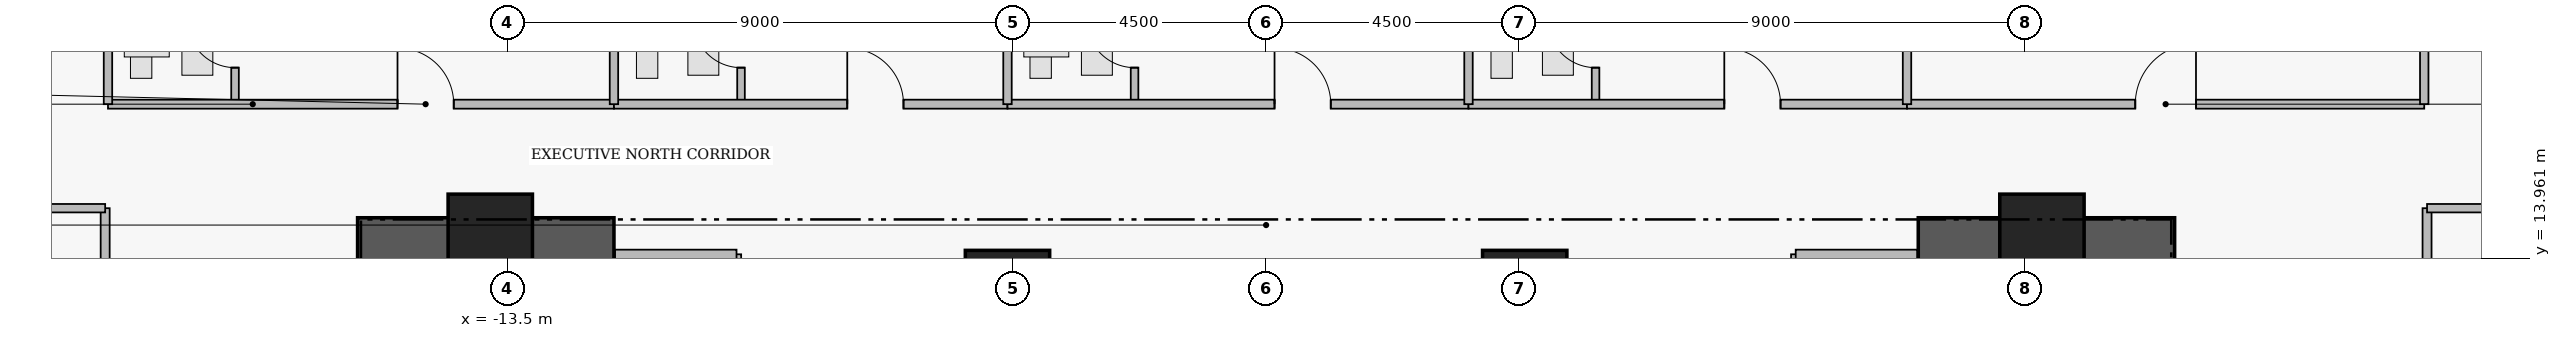
"""IFC4 building model, lengths in metres.
Left out: names, types, materials, properties, quantities, classifications, styles, units other than length and angle.
Written with IfcOpenShell. Run it as: python <this file> out.ifc"""

import sys

from ifc_helpers import new_model, si_unit, direction, frame, frame_2d, origin, origin_2d, place, context, subcontext, project, spatial, rectangle, extrude, element, fill, save


model = new_model("IFC4")
c1 = context("Model", 3, precision=1e-05, world=origin(), true_north=direction((0.0, 1.0)))
c2 = subcontext(c1, "Body", "Model", "MODEL_VIEW")
j1 = project(units=[si_unit("LENGTHUNIT", "METRE"), si_unit("PLANEANGLEUNIT", "RADIAN")], contexts=[c1])
p1 = place(None, origin())
s1 = spatial("IfcSite", under=j1, at=p1, CompositionType="ELEMENT")
p2 = place(p1, origin())
s2 = spatial("IfcBuilding", under=s1, at=p2, CompositionType="ELEMENT")
p3 = place(p2, frame((0.0, 0.0, 117.55)))
s3 = spatial("IfcBuildingStorey", under=s2, at=p3, CompositionType="ELEMENT", Elevation=117.55)
for number, where, z_axis, x_axis in (
    (1, (-16.16, 14.305, 0.0), (0.0, 0.0, 1.0), (1.0, 0.0, 0.0)),
    (2, (11.6, 14.305, 0.0), (0.0, 0.0, 1.0), (1.0, 0.0, 0.0)),
):
    element("IfcWall", number, at=place(p3, frame(where, z_axis=z_axis, x_axis=x_axis)), inside=s3, PredefinedType="SHEAR", context=c2, shape_type="SweptSolid", body=[
        extrude(rectangle(XDim=4.56, YDim=0.75, at=frame_2d((2.28, 0.0))), origin(), (0.0, 0.0, 1.0), 3.46),
    ])
for number, where, z_axis, x_axis in (
    (3, (-13.8, 14.35, 0.0), (0.0, 0.0, 1.0), (1.0, 0.0, 0.0)),
    (4, (-4.6, 13.35, 0.0), (0.0, 0.0, 1.0), (1.0, 0.0, 0.0)),
    (5, (4.6, 13.35, 0.0), (0.0, 0.0, 1.0), (1.0, 0.0, 0.0)),
    (6, (13.8, 14.35, 0.0), (0.0, 0.0, 1.0), (1.0, 0.0, 0.0)),
):
    element("IfcColumn", number, at=place(p3, frame(where, z_axis=z_axis, x_axis=x_axis)), inside=s3, PredefinedType="COLUMN", context=c2, shape_type="SweptSolid", body=[
        extrude(rectangle(XDim=1.5, YDim=1.5, at=origin_2d()), origin(), (0.0, 0.0, 1.0), 3.65),
    ])
p4 = place(p3, frame((-18.34, 16.7, 0.0), z_axis=(0.0, 0.0, 1.0), x_axis=(0.0, 1.0, 0.0)))
e7 = element("IfcWall", 7, at=p4, inside=s3, PredefinedType="PLUMBINGWALL", context=c2, shape_type="SweptSolid", body=[
    extrude(rectangle(XDim=2.36, YDim=0.135, at=frame_2d((1.18, 0.0))), origin(), (0.0, 0.0, 1.0), 3.43),
])
p5 = place(p4, frame((0.65, 0.0, 0.0)))
e8 = element("IfcOpeningElement", 8, at=p5, cuts=e7, PredefinedType="OPENING", context=c2, shape_type="SweptSolid", body=[
    extrude(rectangle(XDim=0.85, YDim=2.1, at=frame_2d((0.425, 1.05))), frame((0.0, 0.077, 0.0), z_axis=(0.0, -1.0, 0.0), x_axis=(1.0, 0.0, 0.0)), (0.0, 0.0, 1.0), 0.155),
])
p6 = place(p3, frame((-20.6, 16.7, 0.0), z_axis=(0.0, 0.0, 1.0), x_axis=(1.0, 0.0, 0.0)))
e9 = element("IfcWall", 9, at=p6, inside=s3, PredefinedType="PARTITIONING", context=c2, shape_type="SweptSolid", body=[
    extrude(rectangle(XDim=9.0, YDim=0.16, at=frame_2d((4.5, 0.0))), origin(), (0.0, 0.0, 1.0), 2.973),
])
p7 = place(p6, frame((5.15, 0.0, 0.0)))
e10 = element("IfcOpeningElement", 10, at=p7, cuts=e9, PredefinedType="OPENING", context=c2, shape_type="SweptSolid", body=[
    extrude(rectangle(XDim=1.0, YDim=2.15, at=frame_2d((0.5, 1.075))), frame((0.0, 0.09, 0.0), z_axis=(0.0, -1.0, 0.0), x_axis=(1.0, 0.0, 0.0)), (0.0, 0.0, 1.0), 0.18),
])
p8 = place(p3, frame((-9.34, 16.7, 0.0), z_axis=(0.0, 0.0, 1.0), x_axis=(0.0, 1.0, 0.0)))
e11 = element("IfcWall", 11, at=p8, inside=s3, PredefinedType="PLUMBINGWALL", context=c2, shape_type="SweptSolid", body=[
    extrude(rectangle(XDim=2.36, YDim=0.135, at=frame_2d((1.18, 0.0))), origin(), (0.0, 0.0, 1.0), 3.43),
])
p9 = place(p8, frame((0.65, 0.0, 0.0)))
e12 = element("IfcOpeningElement", 12, at=p9, cuts=e11, PredefinedType="OPENING", context=c2, shape_type="SweptSolid", body=[
    extrude(rectangle(XDim=0.85, YDim=2.1, at=frame_2d((0.425, 1.05))), frame((0.0, 0.077, 0.0), z_axis=(0.0, -1.0, 0.0), x_axis=(1.0, 0.0, 0.0)), (0.0, 0.0, 1.0), 0.155),
])
p10 = place(p3, frame((-11.6, 16.7, 0.0), z_axis=(0.0, 0.0, 1.0), x_axis=(1.0, 0.0, 0.0)))
e13 = element("IfcWall", 13, at=p10, inside=s3, PredefinedType="PARTITIONING", context=c2, shape_type="SweptSolid", body=[
    extrude(rectangle(XDim=7.0, YDim=0.16, at=frame_2d((3.5, 0.0))), origin(), (0.0, 0.0, 1.0), 2.973),
])
p11 = place(p10, frame((4.15, 0.0, 0.0)))
e14 = element("IfcOpeningElement", 14, at=p11, cuts=e13, PredefinedType="OPENING", context=c2, shape_type="SweptSolid", body=[
    extrude(rectangle(XDim=1.0, YDim=2.15, at=frame_2d((0.5, 1.075))), frame((0.0, 0.09, 0.0), z_axis=(0.0, -1.0, 0.0), x_axis=(1.0, 0.0, 0.0)), (0.0, 0.0, 1.0), 0.18),
])
p12 = place(p3, frame((-2.34, 16.7, 0.0), z_axis=(0.0, 0.0, 1.0), x_axis=(0.0, 1.0, 0.0)))
e15 = element("IfcWall", 15, at=p12, inside=s3, PredefinedType="PLUMBINGWALL", context=c2, shape_type="SweptSolid", body=[
    extrude(rectangle(XDim=2.36, YDim=0.135, at=frame_2d((1.18, 0.0))), origin(), (0.0, 0.0, 1.0), 3.43),
])
p13 = place(p12, frame((0.65, 0.0, 0.0)))
e16 = element("IfcOpeningElement", 16, at=p13, cuts=e15, PredefinedType="OPENING", context=c2, shape_type="SweptSolid", body=[
    extrude(rectangle(XDim=0.85, YDim=2.1, at=frame_2d((0.425, 1.05))), frame((0.0, 0.077, 0.0), z_axis=(0.0, -1.0, 0.0), x_axis=(1.0, 0.0, 0.0)), (0.0, 0.0, 1.0), 0.155),
])
p14 = place(p3, frame((-4.6, 16.7, 0.0), z_axis=(0.0, 0.0, 1.0), x_axis=(1.0, 0.0, 0.0)))
e17 = element("IfcWall", 17, at=p14, inside=s3, PredefinedType="PARTITIONING", context=c2, shape_type="SweptSolid", body=[
    extrude(rectangle(XDim=8.2, YDim=0.16, at=frame_2d((4.1, 0.0))), origin(), (0.0, 0.0, 1.0), 2.973),
])
p15 = place(p14, frame((4.75, 0.0, 0.0)))
e18 = element("IfcOpeningElement", 18, at=p15, cuts=e17, PredefinedType="OPENING", context=c2, shape_type="SweptSolid", body=[
    extrude(rectangle(XDim=1.0, YDim=2.15, at=frame_2d((0.5, 1.075))), frame((0.0, 0.09, 0.0), z_axis=(0.0, -1.0, 0.0), x_axis=(1.0, 0.0, 0.0)), (0.0, 0.0, 1.0), 0.18),
])
p16 = place(p3, frame((5.86, 16.7, 0.0), z_axis=(0.0, 0.0, 1.0), x_axis=(0.0, 1.0, 0.0)))
e19 = element("IfcWall", 19, at=p16, inside=s3, PredefinedType="PLUMBINGWALL", context=c2, shape_type="SweptSolid", body=[
    extrude(rectangle(XDim=2.36, YDim=0.135, at=frame_2d((1.18, 0.0))), origin(), (0.0, 0.0, 1.0), 3.43),
])
p17 = place(p16, frame((0.65, 0.0, 0.0)))
e20 = element("IfcOpeningElement", 20, at=p17, cuts=e19, PredefinedType="OPENING", context=c2, shape_type="SweptSolid", body=[
    extrude(rectangle(XDim=0.85, YDim=2.1, at=frame_2d((0.425, 1.05))), frame((0.0, 0.077, 0.0), z_axis=(0.0, -1.0, 0.0), x_axis=(1.0, 0.0, 0.0)), (0.0, 0.0, 1.0), 0.155),
])
p18 = place(p3, frame((3.6, 16.7, 0.0), z_axis=(0.0, 0.0, 1.0), x_axis=(1.0, 0.0, 0.0)))
e21 = element("IfcWall", 21, at=p18, inside=s3, PredefinedType="PARTITIONING", context=c2, shape_type="SweptSolid", body=[
    extrude(rectangle(XDim=7.8, YDim=0.16, at=frame_2d((3.9, 0.0))), origin(), (0.0, 0.0, 1.0), 2.973),
])
p19 = place(p18, frame((4.55, 0.0, 0.0)))
e22 = element("IfcOpeningElement", 22, at=p19, cuts=e21, PredefinedType="OPENING", context=c2, shape_type="SweptSolid", body=[
    extrude(rectangle(XDim=1.0, YDim=2.15, at=frame_2d((0.5, 1.075))), frame((0.0, 0.09, 0.0), z_axis=(0.0, -1.0, 0.0), x_axis=(1.0, 0.0, 0.0)), (0.0, 0.0, 1.0), 0.18),
])
p20 = place(p3, frame((11.4, 16.7, 0.0), z_axis=(0.0, 0.0, 1.0), x_axis=(1.0, 0.0, 0.0)))
e23 = element("IfcWall", 23, at=p20, inside=s3, PredefinedType="PARTITIONING", context=c2, shape_type="SweptSolid", body=[
    extrude(rectangle(XDim=9.2, YDim=0.16, at=frame_2d((4.6, 0.0))), origin(), (0.0, 0.0, 1.0), 2.973),
])
p21 = place(p20, frame((4.06, 0.0, 0.0)))
e24 = element("IfcOpeningElement", 24, at=p21, cuts=e23, PredefinedType="OPENING", context=c2, shape_type="SweptSolid", body=[
    extrude(rectangle(XDim=1.08, YDim=2.18, at=frame_2d((0.54, 1.09))), frame((0.0, 0.09, 0.0), z_axis=(0.0, -1.0, 0.0), x_axis=(1.0, 0.0, 0.0)), (0.0, 0.0, 1.0), 0.18),
])
p22 = place(p3, frame((20.65, 10.18, 0.0), z_axis=(0.0, 0.0, 1.0), x_axis=(0.0, 1.0, 0.0)))
e25 = element("IfcWall", 25, at=p22, inside=s3, PredefinedType="PARTITIONING", context=c2, shape_type="SweptSolid", body=[
    extrude(rectangle(XDim=4.67, YDim=0.16, at=frame_2d((2.335, 0.0))), origin(), (0.0, 0.0, 1.0), 3.43),
])
p23 = place(p22, frame((1.875, 0.0, 0.0)))
e26 = element("IfcOpeningElement", 26, at=p23, cuts=e25, PredefinedType="OPENING", context=c2, shape_type="SweptSolid", body=[
    extrude(rectangle(XDim=0.92, YDim=2.12, at=frame_2d((0.46, 1.06))), frame((0.0, 0.09, 0.0), z_axis=(0.0, -1.0, 0.0), x_axis=(1.0, 0.0, 0.0)), (0.0, 0.0, 1.0), 0.18),
])
p24 = place(p3, frame((-20.65, 1.55, 0.0), z_axis=(0.0, 0.0, 1.0), x_axis=(0.0, 1.0, 0.0)))
e27 = element("IfcWall", 27, at=p24, inside=s3, PredefinedType="PARTITIONING", context=c2, shape_type="SweptSolid", body=[
    extrude(rectangle(XDim=13.3, YDim=0.16, at=frame_2d((6.65, 0.0))), origin(), (0.0, 0.0, 1.0), 3.43),
])
p25 = place(p24, frame((6.175, 0.0, 0.0)))
e28 = element("IfcOpeningElement", 28, at=p25, cuts=e27, PredefinedType="OPENING", context=c2, shape_type="SweptSolid", body=[
    extrude(rectangle(XDim=0.95, YDim=2.15, at=frame_2d((0.475, 1.075))), frame((0.0, 0.09, 0.0), z_axis=(0.0, -1.0, 0.0), x_axis=(1.0, 0.0, 0.0)), (0.0, 0.0, 1.0), 0.18),
])
p26 = place(p3, frame((-9.42, 11.07, 0.0), z_axis=(0.0, 0.0, 1.0), x_axis=(0.0, 1.0, 0.0)))
e29 = element("IfcWall", 29, at=p26, inside=s3, PredefinedType="PARTITIONING", context=c2, shape_type="SweptSolid", body=[
    extrude(rectangle(XDim=2.96, YDim=0.165, at=frame_2d((1.48, 0.0))), origin(), (0.0, 0.0, 1.0), 3.43),
])
p27 = place(p3, frame((-11.58, 14.03, 0.0), z_axis=(0.0, 0.0, 1.0), x_axis=(1.0, 0.0, 0.0)))
e30 = element("IfcWall", 30, at=p27, inside=s3, PredefinedType="PARTITIONING", context=c2, shape_type="SweptSolid", body=[
    extrude(rectangle(XDim=2.16, YDim=0.165, at=frame_2d((1.08, 0.0))), origin(), (0.0, 0.0, 1.0), 3.43),
])
p28 = place(p3, frame((9.42, 11.07, 0.0), z_axis=(0.0, 0.0, 1.0), x_axis=(0.0, 1.0, 0.0)))
e31 = element("IfcWall", 31, at=p28, inside=s3, PredefinedType="PARTITIONING", context=c2, shape_type="SweptSolid", body=[
    extrude(rectangle(XDim=2.96, YDim=0.165, at=frame_2d((1.48, 0.0))), origin(), (0.0, 0.0, 1.0), 3.43),
])
p29 = place(p3, frame((9.42, 14.03, 0.0), z_axis=(0.0, 0.0, 1.0), x_axis=(1.0, 0.0, 0.0)))
e32 = element("IfcWall", 32, at=p29, inside=s3, PredefinedType="PARTITIONING", context=c2, shape_type="SweptSolid", body=[
    extrude(rectangle(XDim=2.16, YDim=0.165, at=frame_2d((1.08, 0.0))), origin(), (0.0, 0.0, 1.0), 3.43),
])
p30 = place(p3, frame((-20.6, 16.7, 0.0), z_axis=(0.0, 0.0, 1.0), x_axis=(0.0, 1.0, 0.0)))
e33 = element("IfcWall", 33, at=p30, inside=s3, PredefinedType="PARTITIONING", context=c2, shape_type="SweptSolid", body=[
    extrude(rectangle(XDim=8.2, YDim=0.15, at=frame_2d((4.1, 0.0))), origin(), (0.0, 0.0, 1.0), 3.43),
])
p31 = place(p3, frame((-11.6, 16.7, 0.0), z_axis=(0.0, 0.0, 1.0), x_axis=(0.0, 1.0, 0.0)))
e34 = element("IfcWall", 34, at=p31, inside=s3, PredefinedType="PARTITIONING", context=c2, shape_type="SweptSolid", body=[
    extrude(rectangle(XDim=11.62, YDim=0.15, at=frame_2d((5.81, 0.0))), origin(), (0.0, 0.0, 1.0), 3.43),
])
p32 = place(p3, frame((-4.6, 16.7, 0.0), z_axis=(0.0, 0.0, 1.0), x_axis=(0.0, 1.0, 0.0)))
e35 = element("IfcWall", 35, at=p32, inside=s3, PredefinedType="PARTITIONING", context=c2, shape_type="SweptSolid", body=[
    extrude(rectangle(XDim=11.62, YDim=0.15, at=frame_2d((5.81, 0.0))), origin(), (0.0, 0.0, 1.0), 2.503),
])
for number, where, z_axis, x_axis in (
    (36, (3.6, 16.7, 0.0), (0.0, 0.0, 1.0), (0.0, 1.0, 0.0)),
    (37, (11.4, 16.7, 0.0), (0.0, 0.0, 1.0), (0.0, 1.0, 0.0)),
):
    element("IfcWall", number, at=place(p3, frame(where, z_axis=z_axis, x_axis=x_axis)), inside=s3, PredefinedType="PARTITIONING", context=c2, shape_type="SweptSolid", body=[
        extrude(rectangle(XDim=11.62, YDim=0.15, at=frame_2d((5.81, 0.0))), origin(), (0.0, 0.0, 1.0), 3.43),
    ])
p33 = place(p3, frame((20.6, 16.7, 0.0), z_axis=(0.0, 0.0, 1.0), x_axis=(0.0, 1.0, 0.0)))
e38 = element("IfcWall", 38, at=p33, inside=s3, PredefinedType="PARTITIONING", context=c2, shape_type="SweptSolid", body=[
    extrude(rectangle(XDim=8.14, YDim=0.15, at=frame_2d((4.07, 0.0))), origin(), (0.0, 0.0, 1.0), 3.43),
])
for number, where, z_axis, x_axis in (
    (39, (20.65, 14.85, 0.0), (0.0, 0.0, 1.0), (1.0, 0.0, 0.0)),
    (40, (-23.84, 14.85, 0.0), (0.0, 0.0, 1.0), (1.0, 0.0, 0.0)),
):
    element("IfcWall", number, at=place(p3, frame(where, z_axis=z_axis, x_axis=x_axis)), inside=s3, PredefinedType="PARTITIONING", context=c2, shape_type="SweptSolid", body=[
        extrude(rectangle(XDim=3.19, YDim=0.15, at=frame_2d((1.595, 0.0))), origin(), (0.0, 0.0, 1.0), 3.43),
    ])
p34 = place(p5, origin())
e41 = element("IfcDoor", 41, at=p34, inside=s3, OperationType="SINGLE_SWING_RIGHT", PredefinedType="DOOR", context=c2, shape_type="SweptSolid", body=[
    extrude(rectangle(XDim=0.85, YDim=2.1, at=frame_2d((0.425, 1.05))), frame((0.0, 0.025, 0.0), z_axis=(0.0, -1.0, 0.0), x_axis=(1.0, 0.0, 0.0)), (0.0, 0.0, 1.0), 0.05),
])
fill(e8, e41)
p35 = place(p7, origin())
e42 = element("IfcDoor", 42, at=p35, inside=s3, OperationType="SINGLE_SWING_LEFT", PredefinedType="DOOR", context=c2, shape_type="SweptSolid", body=[
    extrude(rectangle(XDim=1.0, YDim=2.15, at=frame_2d((0.5, 1.075))), frame((0.0, 0.025, 0.0), z_axis=(0.0, -1.0, 0.0), x_axis=(1.0, 0.0, 0.0)), (0.0, 0.0, 1.0), 0.05),
])
fill(e10, e42)
p36 = place(p9, origin())
e43 = element("IfcDoor", 43, at=p36, inside=s3, OperationType="SINGLE_SWING_RIGHT", PredefinedType="DOOR", context=c2, shape_type="SweptSolid", body=[
    extrude(rectangle(XDim=0.85, YDim=2.1, at=frame_2d((0.425, 1.05))), frame((0.0, 0.025, 0.0), z_axis=(0.0, -1.0, 0.0), x_axis=(1.0, 0.0, 0.0)), (0.0, 0.0, 1.0), 0.05),
])
fill(e12, e43)
p37 = place(p11, origin())
e44 = element("IfcDoor", 44, at=p37, inside=s3, OperationType="SINGLE_SWING_LEFT", PredefinedType="DOOR", context=c2, shape_type="SweptSolid", body=[
    extrude(rectangle(XDim=1.0, YDim=2.15, at=frame_2d((0.5, 1.075))), frame((0.0, 0.025, 0.0), z_axis=(0.0, -1.0, 0.0), x_axis=(1.0, 0.0, 0.0)), (0.0, 0.0, 1.0), 0.05),
])
fill(e14, e44)
p38 = place(p13, origin())
e45 = element("IfcDoor", 45, at=p38, inside=s3, OperationType="SINGLE_SWING_RIGHT", PredefinedType="DOOR", context=c2, shape_type="SweptSolid", body=[
    extrude(rectangle(XDim=0.85, YDim=2.1, at=frame_2d((0.425, 1.05))), frame((0.0, 0.025, 0.0), z_axis=(0.0, -1.0, 0.0), x_axis=(1.0, 0.0, 0.0)), (0.0, 0.0, 1.0), 0.05),
])
fill(e16, e45)
p39 = place(p15, origin())
e46 = element("IfcDoor", 46, at=p39, inside=s3, OperationType="SINGLE_SWING_LEFT", PredefinedType="DOOR", context=c2, shape_type="SweptSolid", body=[
    extrude(rectangle(XDim=1.0, YDim=2.15, at=frame_2d((0.5, 1.075))), frame((0.0, 0.025, 0.0), z_axis=(0.0, -1.0, 0.0), x_axis=(1.0, 0.0, 0.0)), (0.0, 0.0, 1.0), 0.05),
])
fill(e18, e46)
p40 = place(p17, origin())
e47 = element("IfcDoor", 47, at=p40, inside=s3, OperationType="SINGLE_SWING_RIGHT", PredefinedType="DOOR", context=c2, shape_type="SweptSolid", body=[
    extrude(rectangle(XDim=0.85, YDim=2.1, at=frame_2d((0.425, 1.05))), frame((0.0, 0.025, 0.0), z_axis=(0.0, -1.0, 0.0), x_axis=(1.0, 0.0, 0.0)), (0.0, 0.0, 1.0), 0.05),
])
fill(e20, e47)
p41 = place(p19, origin())
e48 = element("IfcDoor", 48, at=p41, inside=s3, OperationType="SINGLE_SWING_LEFT", PredefinedType="DOOR", context=c2, shape_type="SweptSolid", body=[
    extrude(rectangle(XDim=1.0, YDim=2.15, at=frame_2d((0.5, 1.075))), frame((0.0, 0.025, 0.0), z_axis=(0.0, -1.0, 0.0), x_axis=(1.0, 0.0, 0.0)), (0.0, 0.0, 1.0), 0.05),
])
fill(e22, e48)
p42 = place(p21, origin())
e49 = element("IfcDoor", 49, at=p42, inside=s3, OperationType="SINGLE_SWING_RIGHT", PredefinedType="DOOR", context=c2, shape_type="SweptSolid", body=[
    extrude(rectangle(XDim=1.08, YDim=2.18, at=frame_2d((0.54, 1.09))), frame((0.0, 0.025, 0.0), z_axis=(0.0, -1.0, 0.0), x_axis=(1.0, 0.0, 0.0)), (0.0, 0.0, 1.0), 0.05),
])
fill(e24, e49)
save(model, sys.argv[1])
